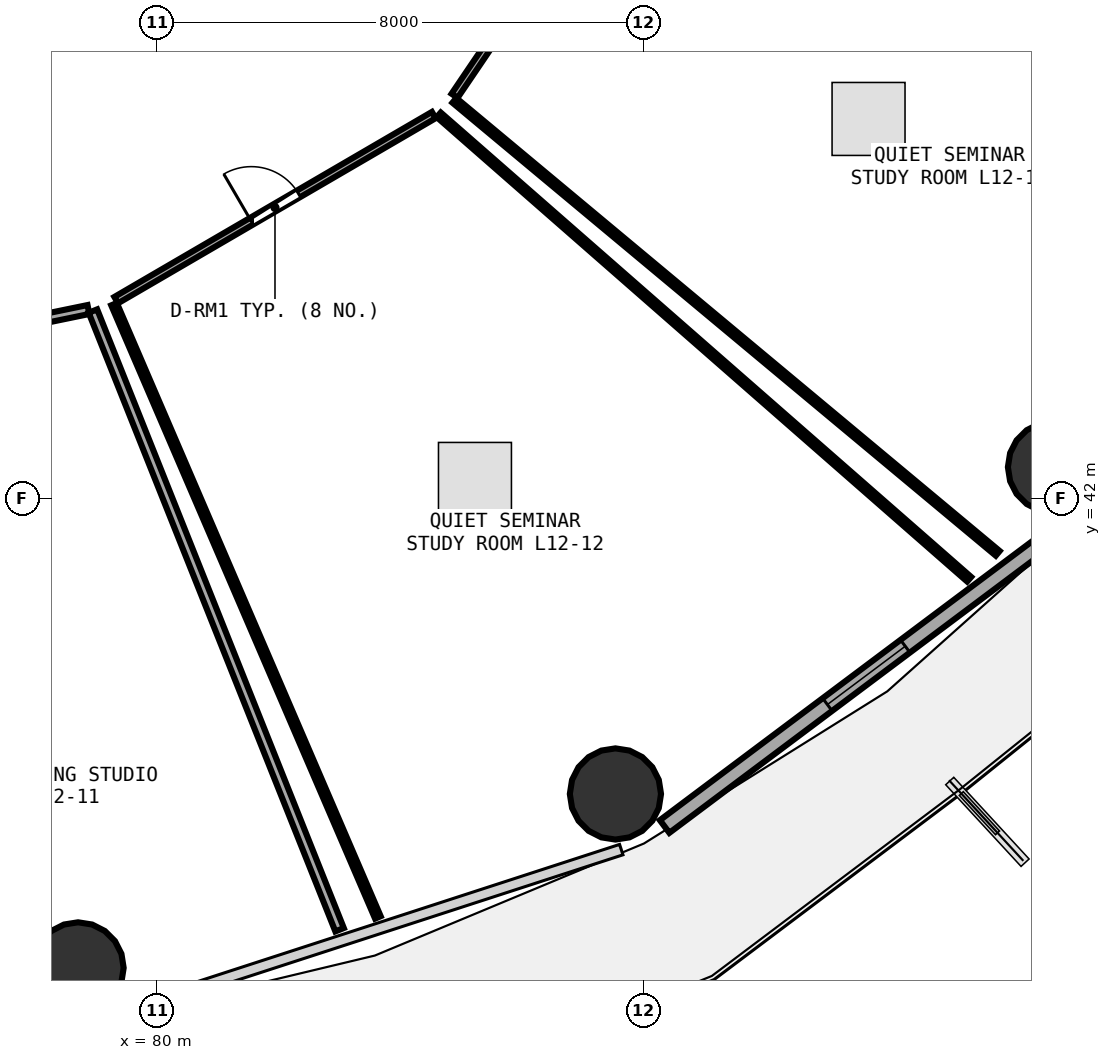
"""IFC4 building model, lengths in metres.
Left out: names, types, materials, properties, quantities, classifications, styles, units other than length and angle.
Written with IfcOpenShell. Run it as: python <this file> out.ifc"""

import sys

from ifc_helpers import new_model, si_unit, direction, frame, frame_2d, origin, origin_2d, place, context, subcontext, project, spatial, rectangle, circle, extrude, element, fill, save


model = new_model("IFC4")
c1 = context("Model", 3, precision=1e-05, world=origin(), true_north=direction((0.0, 1.0)))
c2 = subcontext(c1, "Body", "Model", "MODEL_VIEW")
j1 = project(units=[si_unit("LENGTHUNIT", "METRE"), si_unit("PLANEANGLEUNIT", "RADIAN")], contexts=[c1])
p1 = place(None, origin())
s1 = spatial("IfcSite", under=j1, at=p1, CompositionType="ELEMENT")
p2 = place(p1, origin())
s2 = spatial("IfcBuilding", under=s1, at=p2, CompositionType="ELEMENT")
p3 = place(p2, frame((0.0, 0.0, 48.75)))
s3 = spatial("IfcBuildingStorey", under=s2, at=p3, CompositionType="ELEMENT", Elevation=48.75)
for number, where, z_axis, x_axis in (
    (1, (78.702, 34.286, 0.0), (0.0, 0.0, 1.0), (1.0, 0.0, 0.0)),
    (2, (87.54, 37.146, 0.0), (0.0, 0.0, 1.0), (1.0, 0.0, 0.0)),
    (3, (94.744, 42.522, 0.0), (0.0, 0.0, 1.0), (1.0, 0.0, 0.0)),
):
    element("IfcColumn", number, at=place(p3, frame(where, z_axis=z_axis, x_axis=x_axis)), inside=s3, PredefinedType="COLUMN", context=c2, shape_type="SweptSolid", body=[
        extrude(circle(Radius=0.75, at=origin_2d()), origin(), (0.0, 0.0, 1.0), 3.75),
    ])
p4 = place(p3, frame((88.349, 36.611, 0.0), z_axis=(0.0, 0.0, 1.0), x_axis=(0.80030733173, 0.599590005569, 0.0)))
e4 = element("IfcWall", 4, at=p4, inside=s3, PredefinedType="SOLIDWALL", context=c2, shape_type="SweptSolid", body=[
    extrude(rectangle(XDim=8.291, YDim=0.26, at=frame_2d((4.145, 0.0))), origin(), (0.0, 0.0, 1.0), 3.475),
])
p5 = place(p4, frame((3.345, 0.0, 0.85)))
e5 = element("IfcOpeningElement", 5, at=p5, cuts=e4, PredefinedType="OPENING", context=c2, shape_type="SweptSolid", body=[
    extrude(rectangle(XDim=1.6, YDim=1.45, at=frame_2d((0.8, 0.725))), frame((0.0, 0.14, 0.0), z_axis=(0.0, -1.0, 0.0), x_axis=(1.0, 0.0, 0.0)), (0.0, 0.0, 1.0), 0.28),
])
p6 = place(p3, frame((75.732, 44.467, 0.0), z_axis=(0.0, 0.0, 1.0), x_axis=(0.979521553546, 0.201339330831, 0.0)))
e6 = element("IfcWall", 6, at=p6, inside=s3, PredefinedType="PARTITIONING", context=c2, shape_type="SweptSolid", body=[
    extrude(rectangle(XDim=3.207, YDim=0.15, at=frame_2d((1.604, 0.0))), origin(), (0.0, 0.0, 1.0), 3.235),
])
p7 = place(p6, frame((1.129, 0.0, 0.0)))
e7 = element("IfcOpeningElement", 7, at=p7, cuts=e6, PredefinedType="OPENING", context=c2, shape_type="SweptSolid", body=[
    extrude(rectangle(XDim=0.95, YDim=2.08, at=frame_2d((0.475, 1.04))), frame((0.0, 0.085, 0.0), z_axis=(0.0, -1.0, 0.0), x_axis=(1.0, 0.0, 0.0)), (0.0, 0.0, 1.0), 0.17),
])
p8 = place(p3, frame((79.33, 45.268, 0.0), z_axis=(0.0, 0.0, 1.0), x_axis=(0.864061520755, 0.503386221852, 0.0)))
e8 = element("IfcWall", 8, at=p8, inside=s3, PredefinedType="PARTITIONING", context=c2, shape_type="SweptSolid", body=[
    extrude(rectangle(XDim=6.044, YDim=0.12, at=frame_2d((3.022, 0.0))), origin(), (0.0, 0.0, 1.0), 2.875),
])
p9 = place(p8, frame((2.572, 0.0, 0.0)))
e9 = element("IfcOpeningElement", 9, at=p9, cuts=e8, PredefinedType="OPENING", context=c2, shape_type="SweptSolid", body=[
    extrude(rectangle(XDim=0.9, YDim=2.08, at=frame_2d((0.45, 1.04))), frame((0.0, 0.07, 0.0), z_axis=(0.0, -1.0, 0.0), x_axis=(1.0, 0.0, 0.0)), (0.0, 0.0, 1.0), 0.14),
])
p10 = place(p3, frame((84.895, 48.628, 0.0), z_axis=(0.0, 0.0, 1.0), x_axis=(0.560933949984, 0.827860558159, 0.0)))
e10 = element("IfcWall", 10, at=p10, inside=s3, PredefinedType="PARTITIONING", context=c2, shape_type="SweptSolid", body=[
    extrude(rectangle(XDim=5.788, YDim=0.12, at=frame_2d((2.894, 0.0))), origin(), (0.0, 0.0, 1.0), 2.875),
])
p11 = place(p10, frame((2.444, 0.0, 0.0)))
e11 = element("IfcOpeningElement", 11, at=p11, cuts=e10, PredefinedType="OPENING", context=c2, shape_type="SweptSolid", body=[
    extrude(rectangle(XDim=0.9, YDim=2.08, at=frame_2d((0.45, 1.04))), frame((0.0, 0.07, 0.0), z_axis=(0.0, -1.0, 0.0), x_axis=(1.0, 0.0, 0.0)), (0.0, 0.0, 1.0), 0.14),
])
p12 = place(p3, frame((78.947, 45.088, 0.0), z_axis=(0.0, 0.0, 1.0), x_axis=(0.370325956987, -0.928901870803, 0.0)))
e12 = element("IfcWall", 12, at=p12, inside=s3, PredefinedType="PARTITIONING", context=c2, shape_type="SweptSolid", body=[
    extrude(rectangle(XDim=10.954, YDim=0.15, at=frame_2d((5.477, 0.0))), origin(), (0.0, 0.0, 1.0), 2.875),
])
p13 = place(p3, frame((84.634, 48.315, 0.0), z_axis=(0.0, 0.0, 1.0), x_axis=(0.752403187404, -0.658702849231, 0.0)))
e13 = element("IfcWall", 13, at=p13, inside=s3, PredefinedType="PARTITIONING", context=c2, shape_type="SweptSolid", body=[
    extrude(rectangle(XDim=11.595, YDim=0.1, at=frame_2d((5.797, 0.0))), origin(), (0.0, 0.0, 1.0), 2.875),
])
p14 = place(p3, frame((83.633, 35.116, 0.0), z_axis=(0.0, 0.0, 1.0), x_axis=(-0.395239231563, 0.918578221946, 0.0)))
e14 = element("IfcWall", 14, at=p14, inside=s3, PredefinedType="PARTITIONING", context=c2, shape_type="SweptSolid", body=[
    extrude(rectangle(XDim=10.98, YDim=0.1, at=frame_2d((5.49, 0.0))), origin(), (0.0, 0.0, 1.0), 2.875),
])
p15 = place(p3, frame((93.827, 41.104, 0.0), z_axis=(0.0, 0.0, 1.0), x_axis=(-0.768116338219, 0.640310308336, 0.0)))
e15 = element("IfcWall", 15, at=p15, inside=s3, PredefinedType="PARTITIONING", context=c2, shape_type="SweptSolid", body=[
    extrude(rectangle(XDim=11.633, YDim=0.1, at=frame_2d((5.817, 0.0))), origin(), (0.0, 0.0, 1.0), 2.875),
])
p16 = place(p5, origin())
e16 = element("IfcWindow", 16, at=p16, inside=s3, PartitioningType="SINGLE_PANEL", PredefinedType="WINDOW", context=c2, shape_type="SweptSolid", body=[
    extrude(rectangle(XDim=1.6, YDim=1.45, at=frame_2d((0.8, 0.725))), frame((0.0, 0.03, 0.0), z_axis=(0.0, -1.0, 0.0), x_axis=(1.0, 0.0, 0.0)), (0.0, 0.0, 1.0), 0.06),
])
fill(e5, e16)
p17 = place(p9, origin())
e17 = element("IfcDoor", 17, at=p17, inside=s3, OperationType="SINGLE_SWING_LEFT", PredefinedType="DOOR", context=c2, shape_type="SweptSolid", body=[
    extrude(rectangle(XDim=0.9, YDim=2.08, at=frame_2d((0.45, 1.04))), frame((0.0, 0.025, 0.0), z_axis=(0.0, -1.0, 0.0), x_axis=(1.0, 0.0, 0.0)), (0.0, 0.0, 1.0), 0.05),
])
fill(e9, e17)
save(model, sys.argv[1])
